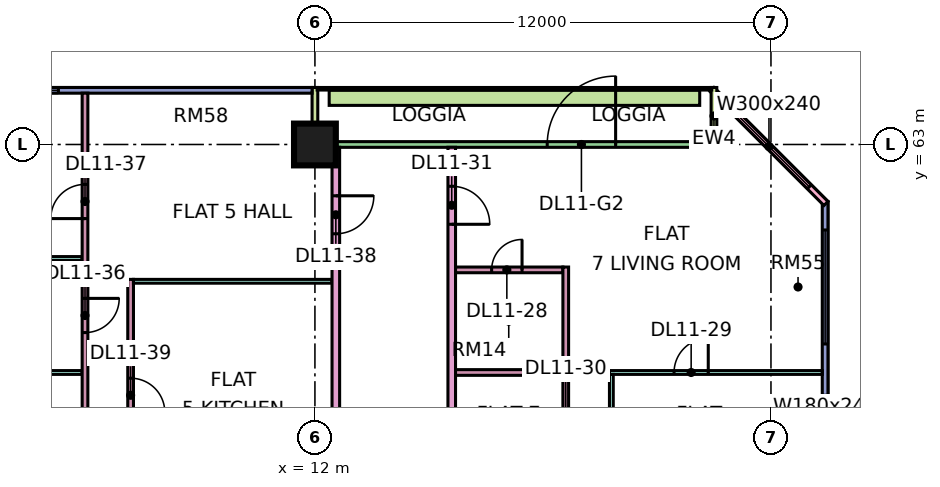
"""IFC4 building model, lengths in metres.
Left out: names, types, materials, properties, quantities, classifications, styles, units other than length and angle.
Written with IfcOpenShell. Run it as: python <this file> out.ifc"""

import sys

from ifc_helpers import new_model, si_unit, direction, frame, frame_2d, origin, origin_2d, place, context, subcontext, project, spatial, rectangle, extrude, element, fill, save


model = new_model("IFC4")
c1 = context("Model", 3, precision=1e-05, world=origin(), true_north=direction((0.0, 1.0)))
c2 = subcontext(c1, "Body", "Model", "MODEL_VIEW")
j1 = project(units=[si_unit("LENGTHUNIT", "METRE"), si_unit("PLANEANGLEUNIT", "RADIAN")], contexts=[c1])
p1 = place(None, origin())
s1 = spatial("IfcSite", under=j1, at=p1, CompositionType="ELEMENT")
p2 = place(p1, origin())
s2 = spatial("IfcBuilding", under=s1, at=p2, CompositionType="ELEMENT")
p3 = place(p2, frame((0.0, 0.0, 56.4)))
s3 = spatial("IfcBuildingStorey", under=s2, at=p3, CompositionType="ELEMENT", Elevation=56.4)
p4 = place(p3, frame((12.0, 63.0, 0.0), z_axis=(0.0, 0.0, 1.0), x_axis=(1.0, 0.0, 0.0)))
e1 = element("IfcColumn", 1, at=p4, inside=s3, PredefinedType="COLUMN", context=c2, shape_type="SweptSolid", body=[
    extrude(rectangle(XDim=1.1, YDim=1.1, at=origin_2d()), origin(), (0.0, 0.0, 1.0), 3.75),
])
p5 = place(p3, frame((25.425, 48.075, 0.0), z_axis=(0.0, 0.0, 1.0), x_axis=(0.0, 1.0, 0.0)))
e2 = element("IfcWall", 2, at=p5, inside=s3, PredefinedType="SOLIDWALL", context=c2, shape_type="SweptSolid", body=[
    extrude(rectangle(XDim=13.425, YDim=0.15, at=frame_2d((6.712, 0.0))), origin(), (0.0, 0.0, 1.0), 3.35),
])
p6 = place(p5, frame((0.562, 0.0, 0.45)))
e3 = element("IfcOpeningElement", 3, at=p6, cuts=e2, PredefinedType="OPENING", context=c2, shape_type="SweptSolid", body=[
    extrude(rectangle(XDim=4.8, YDim=2.4, at=frame_2d((2.4, 1.2))), frame((0.0, 0.085, 0.0), z_axis=(0.0, -1.0, 0.0), x_axis=(1.0, 0.0, 0.0)), (0.0, 0.0, 1.0), 0.17),
])
p7 = place(p5, frame((6.525, 0.0, 0.45)))
e4 = element("IfcOpeningElement", 4, at=p7, cuts=e2, PredefinedType="OPENING", context=c2, shape_type="SweptSolid", body=[
    extrude(rectangle(XDim=1.8, YDim=2.4, at=frame_2d((0.9, 1.2))), frame((0.0, 0.085, 0.0), z_axis=(0.0, -1.0, 0.0), x_axis=(1.0, 0.0, 0.0)), (0.0, 0.0, 1.0), 0.17),
])
p8 = place(p5, frame((9.675, 0.0, 0.45)))
e5 = element("IfcOpeningElement", 5, at=p8, cuts=e2, PredefinedType="OPENING", context=c2, shape_type="SweptSolid", body=[
    extrude(rectangle(XDim=3.0, YDim=2.4, at=frame_2d((1.5, 1.2))), frame((0.0, 0.085, 0.0), z_axis=(0.0, -1.0, 0.0), x_axis=(1.0, 0.0, 0.0)), (0.0, 0.0, 1.0), 0.17),
])
p9 = place(p3, frame((25.447, 61.447, 0.0), z_axis=(0.0, 0.0, 1.0), x_axis=(-0.707106781187, 0.707106781187, 0.0)))
e6 = element("IfcWall", 6, at=p9, inside=s3, PredefinedType="SOLIDWALL", context=c2, shape_type="SweptSolid", body=[
    extrude(rectangle(XDim=4.243, YDim=0.15, at=frame_2d((2.121, 0.0))), origin(), (0.0, 0.0, 1.0), 3.35),
])
p10 = place(p9, frame((0.621, 0.0, 0.45)))
e7 = element("IfcOpeningElement", 7, at=p10, cuts=e6, PredefinedType="OPENING", context=c2, shape_type="SweptSolid", body=[
    extrude(rectangle(XDim=3.0, YDim=2.4, at=frame_2d((1.5, 1.2))), frame((0.0, 0.085, 0.0), z_axis=(0.0, -1.0, 0.0), x_axis=(1.0, 0.0, 0.0)), (0.0, 0.0, 1.0), 0.17),
])
p11 = place(p3, frame((22.425, 63.0, 0.0), z_axis=(0.0, 0.0, 1.0), x_axis=(-1.0, 0.0, 0.0)))
e8 = element("IfcWall", 8, at=p11, inside=s3, PredefinedType="SOLIDWALL", context=c2, shape_type="SweptSolid", body=[
    extrude(rectangle(XDim=10.35, YDim=0.15, at=frame_2d((5.175, 0.0))), origin(), (0.0, 0.0, 1.0), 3.35),
])
p12 = place(p11, frame((2.512, 0.0, 0.0)))
e9 = element("IfcOpeningElement", 9, at=p12, cuts=e8, PredefinedType="OPENING", context=c2, shape_type="SweptSolid", body=[
    extrude(rectangle(XDim=1.8, YDim=2.4, at=frame_2d((0.9, 1.2))), frame((0.0, 0.085, 0.0), z_axis=(0.0, -1.0, 0.0), x_axis=(1.0, 0.0, 0.0)), (0.0, 0.0, 1.0), 0.17),
])
for number, where, z_axis, x_axis in (
    (10, (22.5, 64.5, 0.0), (0.0, 0.0, 1.0), (0.0, -1.0, 0.0)),
    (11, (12.0, 64.5, 0.0), (0.0, 0.0, 1.0), (0.0, -1.0, 0.0)),
):
    element("IfcWall", number, at=place(p3, frame(where, z_axis=z_axis, x_axis=x_axis)), inside=s3, PredefinedType="SOLIDWALL", context=c2, shape_type="SweptSolid", body=[
        extrude(rectangle(XDim=1.5, YDim=0.15, at=frame_2d((0.75, 0.0))), origin(), (0.0, 0.0, 1.0), 3.35),
    ])
p13 = place(p3, frame((11.925, 64.425, 0.0), z_axis=(0.0, 0.0, 1.0), x_axis=(-1.0, 0.0, 0.0)))
e12 = element("IfcWall", 12, at=p13, inside=s3, PredefinedType="SOLIDWALL", context=c2, shape_type="SweptSolid", body=[
    extrude(rectangle(XDim=10.425, YDim=0.15, at=frame_2d((5.212, 0.0))), origin(), (0.0, 0.0, 1.0), 3.35),
])
p14 = place(p13, frame((6.675, 0.0, 0.45)))
e13 = element("IfcOpeningElement", 13, at=p14, cuts=e12, PredefinedType="OPENING", context=c2, shape_type="SweptSolid", body=[
    extrude(rectangle(XDim=3.0, YDim=2.4, at=frame_2d((1.5, 1.2))), frame((0.0, 0.085, 0.0), z_axis=(0.0, -1.0, 0.0), x_axis=(1.0, 0.0, 0.0)), (0.0, 0.0, 1.0), 0.17),
])
p15 = place(p3, frame((22.125, 64.229, 0.0), z_axis=(0.0, 0.0, 1.0), x_axis=(-1.0, 0.0, 0.0)))
e14 = element("IfcWall", 14, at=p15, inside=s3, PredefinedType="SOLIDWALL", context=c2, shape_type="SweptSolid", body=[
    extrude(rectangle(XDim=9.75, YDim=0.4, at=frame_2d((4.875, 0.0))), origin(), (0.0, 0.0, 1.0), 0.7),
])
for number, where, z_axis, x_axis in (
    (15, (-1.351, 57.0, 0.0), (0.0, 0.0, 1.0), (1.0, 0.0, 0.0)),
    (16, (-1.351, 60.0, 0.0), (0.0, 0.0, 1.0), (1.0, 0.0, 0.0)),
):
    element("IfcWall", number, at=place(p3, frame(where, z_axis=z_axis, x_axis=x_axis)), inside=s3, PredefinedType="PARTITIONING", context=c2, shape_type="SweptSolid", body=[
        extrude(rectangle(XDim=7.226, YDim=0.1, at=frame_2d((3.613, 0.0))), origin(), (0.0, 0.0, 1.0), 3.35),
    ])
p16 = place(p3, frame((5.95, 36.1, 0.0), z_axis=(0.0, 0.0, 1.0), x_axis=(0.0, 1.0, 0.0)))
e17 = element("IfcWall", 17, at=p16, inside=s3, PredefinedType="PARTITIONING", context=c2, shape_type="SweptSolid", body=[
    extrude(rectangle(XDim=28.25, YDim=0.15, at=frame_2d((14.125, 0.0))), origin(), (0.0, 0.0, 1.0), 3.35),
])
p17 = place(p16, frame((3.95, 0.0, 0.0)))
e18 = element("IfcOpeningElement", 18, at=p17, cuts=e17, PredefinedType="OPENING", context=c2, shape_type="SweptSolid", body=[
    extrude(rectangle(XDim=0.9, YDim=2.1, at=frame_2d((0.45, 1.05))), frame((0.0, 0.085, 0.0), z_axis=(0.0, -1.0, 0.0), x_axis=(1.0, 0.0, 0.0)), (0.0, 0.0, 1.0), 0.17),
])
p18 = place(p16, frame((12.95, 0.0, 0.0)))
e19 = element("IfcOpeningElement", 19, at=p18, cuts=e17, PredefinedType="OPENING", context=c2, shape_type="SweptSolid", body=[
    extrude(rectangle(XDim=0.9, YDim=2.1, at=frame_2d((0.45, 1.05))), frame((0.0, 0.085, 0.0), z_axis=(0.0, -1.0, 0.0), x_axis=(1.0, 0.0, 0.0)), (0.0, 0.0, 1.0), 0.17),
])
p19 = place(p16, frame((18.95, 0.0, 0.0)))
e20 = element("IfcOpeningElement", 20, at=p19, cuts=e17, PredefinedType="OPENING", context=c2, shape_type="SweptSolid", body=[
    extrude(rectangle(XDim=0.9, YDim=2.1, at=frame_2d((0.45, 1.05))), frame((0.0, 0.085, 0.0), z_axis=(0.0, -1.0, 0.0), x_axis=(1.0, 0.0, 0.0)), (0.0, 0.0, 1.0), 0.17),
])
p20 = place(p16, frame((21.95, 0.0, 0.0)))
e21 = element("IfcOpeningElement", 21, at=p20, cuts=e17, PredefinedType="OPENING", context=c2, shape_type="SweptSolid", body=[
    extrude(rectangle(XDim=0.9, YDim=2.1, at=frame_2d((0.45, 1.05))), frame((0.0, 0.085, 0.0), z_axis=(0.0, -1.0, 0.0), x_axis=(1.0, 0.0, 0.0)), (0.0, 0.0, 1.0), 0.17),
])
p21 = place(p16, frame((24.95, 0.0, 0.0)))
e22 = element("IfcOpeningElement", 22, at=p21, cuts=e17, PredefinedType="OPENING", context=c2, shape_type="SweptSolid", body=[
    extrude(rectangle(XDim=0.9, YDim=2.1, at=frame_2d((0.45, 1.05))), frame((0.0, 0.085, 0.0), z_axis=(0.0, -1.0, 0.0), x_axis=(1.0, 0.0, 0.0)), (0.0, 0.0, 1.0), 0.17),
])
p22 = place(p16, frame((15.95, 0.0, 0.0)))
e23 = element("IfcOpeningElement", 23, at=p22, cuts=e17, PredefinedType="OPENING", context=c2, shape_type="SweptSolid", body=[
    extrude(rectangle(XDim=0.9, YDim=2.1, at=frame_2d((0.45, 1.05))), frame((0.0, 0.085, 0.0), z_axis=(0.0, -1.0, 0.0), x_axis=(1.0, 0.0, 0.0)), (0.0, 0.0, 1.0), 0.17),
])
p23 = place(p16, frame((10.8, 0.0, 0.0)))
e24 = element("IfcOpeningElement", 24, at=p23, cuts=e17, PredefinedType="OPENING", context=c2, shape_type="SweptSolid", body=[
    extrude(rectangle(XDim=0.8, YDim=2.1, at=frame_2d((0.4, 1.05))), frame((0.0, 0.085, 0.0), z_axis=(0.0, -1.0, 0.0), x_axis=(1.0, 0.0, 0.0)), (0.0, 0.0, 1.0), 0.17),
])
p24 = place(p16, frame((0.55, 0.0, 0.0)))
e25 = element("IfcOpeningElement", 25, at=p24, cuts=e17, PredefinedType="OPENING", context=c2, shape_type="SweptSolid", body=[
    extrude(rectangle(XDim=1.6, YDim=2.1, at=frame_2d((0.8, 1.05))), frame((0.0, 0.085, 0.0), z_axis=(0.0, -1.0, 0.0), x_axis=(1.0, 0.0, 0.0)), (0.0, 0.0, 1.0), 0.17),
])
p25 = place(p16, frame((6.95, 0.0, 0.0)))
e26 = element("IfcOpeningElement", 26, at=p25, cuts=e17, PredefinedType="OPENING", context=c2, shape_type="SweptSolid", body=[
    extrude(rectangle(XDim=0.9, YDim=2.1, at=frame_2d((0.45, 1.05))), frame((0.0, 0.085, 0.0), z_axis=(0.0, -1.0, 0.0), x_axis=(1.0, 0.0, 0.0)), (0.0, 0.0, 1.0), 0.17),
])
p26 = place(p3, frame((7.15, 36.1, 0.0), z_axis=(0.0, 0.0, 1.0), x_axis=(0.0, 1.0, 0.0)))
e27 = element("IfcWall", 27, at=p26, inside=s3, PredefinedType="PARTITIONING", context=c2, shape_type="SweptSolid", body=[
    extrude(rectangle(XDim=23.35, YDim=0.15, at=frame_2d((11.675, 0.0))), origin(), (0.0, 0.0, 1.0), 3.35),
])
p27 = place(p26, frame((10.25, 0.0, 0.0)))
e28 = element("IfcOpeningElement", 28, at=p27, cuts=e27, PredefinedType="OPENING", context=c2, shape_type="SweptSolid", body=[
    extrude(rectangle(XDim=0.8, YDim=2.1, at=frame_2d((0.4, 1.05))), frame((0.0, 0.085, 0.0), z_axis=(0.0, -1.0, 0.0), x_axis=(1.0, 0.0, 0.0)), (0.0, 0.0, 1.0), 0.17),
])
p28 = place(p26, frame((19.85, 0.0, 0.0)))
e29 = element("IfcOpeningElement", 29, at=p28, cuts=e27, PredefinedType="OPENING", context=c2, shape_type="SweptSolid", body=[
    extrude(rectangle(XDim=0.9, YDim=2.1, at=frame_2d((0.45, 1.05))), frame((0.0, 0.085, 0.0), z_axis=(0.0, -1.0, 0.0), x_axis=(1.0, 0.0, 0.0)), (0.0, 0.0, 1.0), 0.17),
])
p29 = place(p26, frame((3.65, 0.0, 0.0)))
e30 = element("IfcOpeningElement", 30, at=p29, cuts=e27, PredefinedType="OPENING", context=c2, shape_type="SweptSolid", body=[
    extrude(rectangle(XDim=0.8, YDim=2.1, at=frame_2d((0.4, 1.05))), frame((0.0, 0.085, 0.0), z_axis=(0.0, -1.0, 0.0), x_axis=(1.0, 0.0, 0.0)), (0.0, 0.0, 1.0), 0.17),
])
p30 = place(p26, frame((13.25, 0.0, 0.0)))
e31 = element("IfcOpeningElement", 31, at=p30, cuts=e27, PredefinedType="OPENING", context=c2, shape_type="SweptSolid", body=[
    extrude(rectangle(XDim=0.8, YDim=2.1, at=frame_2d((0.4, 1.05))), frame((0.0, 0.085, 0.0), z_axis=(0.0, -1.0, 0.0), x_axis=(1.0, 0.0, 0.0)), (0.0, 0.0, 1.0), 0.17),
])
p31 = place(p26, frame((15.65, 0.0, 0.0)))
e32 = element("IfcOpeningElement", 32, at=p31, cuts=e27, PredefinedType="OPENING", context=c2, shape_type="SweptSolid", body=[
    extrude(rectangle(XDim=0.8, YDim=2.1, at=frame_2d((0.4, 1.05))), frame((0.0, 0.085, 0.0), z_axis=(0.0, -1.0, 0.0), x_axis=(1.0, 0.0, 0.0)), (0.0, 0.0, 1.0), 0.17),
])
p32 = place(p26, frame((0.65, 0.0, 0.0)))
e33 = element("IfcOpeningElement", 33, at=p32, cuts=e27, PredefinedType="OPENING", context=c2, shape_type="SweptSolid", body=[
    extrude(rectangle(XDim=0.9, YDim=2.1, at=frame_2d((0.45, 1.05))), frame((0.0, 0.085, 0.0), z_axis=(0.0, -1.0, 0.0), x_axis=(1.0, 0.0, 0.0)), (0.0, 0.0, 1.0), 0.17),
])
p33 = place(p26, frame((6.95, 0.0, 0.0)))
e34 = element("IfcOpeningElement", 34, at=p33, cuts=e27, PredefinedType="OPENING", context=c2, shape_type="SweptSolid", body=[
    extrude(rectangle(XDim=0.8, YDim=2.1, at=frame_2d((0.4, 1.05))), frame((0.0, 0.085, 0.0), z_axis=(0.0, -1.0, 0.0), x_axis=(1.0, 0.0, 0.0)), (0.0, 0.0, 1.0), 0.17),
])
p34 = place(p3, frame((7.225, 59.4, 0.0), z_axis=(0.0, 0.0, 1.0), x_axis=(1.0, 0.0, 0.0)))
e35 = element("IfcWall", 35, at=p34, inside=s3, PredefinedType="PARTITIONING", context=c2, shape_type="SweptSolid", body=[
    extrude(rectangle(XDim=5.225, YDim=0.1, at=frame_2d((2.612, 0.0))), origin(), (0.0, 0.0, 1.0), 3.35),
])
p35 = place(p3, frame((12.55, 20.0, 0.0), z_axis=(0.0, 0.0, 1.0), x_axis=(0.0, 1.0, 0.0)))
e36 = element("IfcWall", 36, at=p35, inside=s3, PredefinedType="PARTITIONING", context=c2, shape_type="SweptSolid", body=[
    extrude(rectangle(XDim=42.926, YDim=0.2, at=frame_2d((21.463, 0.0))), origin(), (0.0, 0.0, 1.0), 3.35),
])
p36 = place(p35, frame((40.65, 0.0, 0.0)))
e37 = element("IfcOpeningElement", 37, at=p36, cuts=e36, PredefinedType="OPENING", context=c2, shape_type="SweptSolid", body=[
    extrude(rectangle(XDim=1.0, YDim=2.1, at=frame_2d((0.5, 1.05))), frame((0.0, 0.11, 0.0), z_axis=(0.0, -1.0, 0.0), x_axis=(1.0, 0.0, 0.0)), (0.0, 0.0, 1.0), 0.22),
])
p37 = place(p35, frame((0.6, 0.0, 0.0)))
e38 = element("IfcOpeningElement", 38, at=p37, cuts=e36, PredefinedType="OPENING", context=c2, shape_type="SweptSolid", body=[
    extrude(rectangle(XDim=1.2, YDim=2.1, at=frame_2d((0.6, 1.05))), frame((0.0, 0.11, 0.0), z_axis=(0.0, -1.0, 0.0), x_axis=(1.0, 0.0, 0.0)), (0.0, 0.0, 1.0), 0.22),
])
p38 = place(p35, frame((14.1, 0.0, 0.0)))
e39 = element("IfcOpeningElement", 39, at=p38, cuts=e36, PredefinedType="OPENING", context=c2, shape_type="SweptSolid", body=[
    extrude(rectangle(XDim=1.0, YDim=2.1, at=frame_2d((0.5, 1.05))), frame((0.0, 0.11, 0.0), z_axis=(0.0, -1.0, 0.0), x_axis=(1.0, 0.0, 0.0)), (0.0, 0.0, 1.0), 0.22),
])
p39 = place(p3, frame((15.6, 51.225, 0.0), z_axis=(0.0, 0.0, 1.0), x_axis=(0.0, 1.0, 0.0)))
e40 = element("IfcWall", 40, at=p39, inside=s3, PredefinedType="PARTITIONING", context=c2, shape_type="SweptSolid", body=[
    extrude(rectangle(XDim=11.701, YDim=0.2, at=frame_2d((5.851, 0.0))), origin(), (0.0, 0.0, 1.0), 3.35),
])
p40 = place(p39, frame((9.675, 0.0, 0.0)))
e41 = element("IfcOpeningElement", 41, at=p40, cuts=e40, PredefinedType="OPENING", context=c2, shape_type="SweptSolid", body=[
    extrude(rectangle(XDim=1.0, YDim=2.1, at=frame_2d((0.5, 1.05))), frame((0.0, 0.11, 0.0), z_axis=(0.0, -1.0, 0.0), x_axis=(1.0, 0.0, 0.0)), (0.0, 0.0, 1.0), 0.22),
])
p41 = place(p3, frame((15.7, 57.0, 0.0), z_axis=(0.0, 0.0, 1.0), x_axis=(1.0, 0.0, 0.0)))
e42 = element("IfcWall", 42, at=p41, inside=s3, PredefinedType="PARTITIONING", context=c2, shape_type="SweptSolid", body=[
    extrude(rectangle(XDim=2.825, YDim=0.15, at=frame_2d((1.413, 0.0))), origin(), (0.0, 0.0, 1.0), 3.35),
])
p42 = place(p3, frame((15.7, 59.7, 0.0), z_axis=(0.0, 0.0, 1.0), x_axis=(1.0, 0.0, 0.0)))
e43 = element("IfcWall", 43, at=p42, inside=s3, PredefinedType="PARTITIONING", context=c2, shape_type="SweptSolid", body=[
    extrude(rectangle(XDim=2.825, YDim=0.15, at=frame_2d((1.413, 0.0))), origin(), (0.0, 0.0, 1.0), 3.35),
])
p43 = place(p42, frame((0.95, 0.0, 0.0)))
e44 = element("IfcOpeningElement", 44, at=p43, cuts=e43, PredefinedType="OPENING", context=c2, shape_type="SweptSolid", body=[
    extrude(rectangle(XDim=0.8, YDim=2.1, at=frame_2d((0.4, 1.05))), frame((0.0, 0.085, 0.0), z_axis=(0.0, -1.0, 0.0), x_axis=(1.0, 0.0, 0.0)), (0.0, 0.0, 1.0), 0.17),
])
p44 = place(p3, frame((18.6, 54.1, 0.0), z_axis=(0.0, 0.0, 1.0), x_axis=(0.0, 1.0, 0.0)))
e45 = element("IfcWall", 45, at=p44, inside=s3, PredefinedType="PARTITIONING", context=c2, shape_type="SweptSolid", body=[
    extrude(rectangle(XDim=5.675, YDim=0.15, at=frame_2d((2.837, 0.0))), origin(), (0.0, 0.0, 1.0), 3.35),
])
p45 = place(p44, frame((0.95, 0.0, 0.0)))
e46 = element("IfcOpeningElement", 46, at=p45, cuts=e45, PredefinedType="OPENING", context=c2, shape_type="SweptSolid", body=[
    extrude(rectangle(XDim=0.9, YDim=2.1, at=frame_2d((0.45, 1.05))), frame((0.0, 0.085, 0.0), z_axis=(0.0, -1.0, 0.0), x_axis=(1.0, 0.0, 0.0)), (0.0, 0.0, 1.0), 0.17),
])
p46 = place(p3, frame((19.75, 57.0, 0.0), z_axis=(0.0, 0.0, 1.0), x_axis=(1.0, 0.0, 0.0)))
e47 = element("IfcWall", 47, at=p46, inside=s3, PredefinedType="PARTITIONING", context=c2, shape_type="SweptSolid", body=[
    extrude(rectangle(XDim=5.6, YDim=0.1, at=frame_2d((2.8, 0.0))), origin(), (0.0, 0.0, 1.0), 3.35),
])
p47 = place(p46, frame((1.7, 0.0, 0.0)))
e48 = element("IfcOpeningElement", 48, at=p47, cuts=e47, PredefinedType="OPENING", context=c2, shape_type="SweptSolid", body=[
    extrude(rectangle(XDim=0.9, YDim=2.1, at=frame_2d((0.45, 1.05))), frame((0.0, 0.06, 0.0), z_axis=(0.0, -1.0, 0.0), x_axis=(1.0, 0.0, 0.0)), (0.0, 0.0, 1.0), 0.12),
])
p48 = place(p3, frame((19.8, 54.1, 0.0), z_axis=(0.0, 0.0, 1.0), x_axis=(0.0, 1.0, 0.0)))
e49 = element("IfcWall", 49, at=p48, inside=s3, PredefinedType="PARTITIONING", context=c2, shape_type="SweptSolid", body=[
    extrude(rectangle(XDim=2.85, YDim=0.1, at=frame_2d((1.425, 0.0))), origin(), (0.0, 0.0, 1.0), 3.35),
])
p49 = place(p7, origin())
e50 = element("IfcWindow", 50, at=p49, inside=s3, PartitioningType="SINGLE_PANEL", PredefinedType="WINDOW", context=c2, shape_type="SweptSolid", body=[
    extrude(rectangle(XDim=1.8, YDim=2.4, at=frame_2d((0.9, 1.2))), frame((0.0, 0.03, 0.0), z_axis=(0.0, -1.0, 0.0), x_axis=(1.0, 0.0, 0.0)), (0.0, 0.0, 1.0), 0.06),
])
fill(e4, e50)
p50 = place(p8, origin())
e51 = element("IfcWindow", 51, at=p50, inside=s3, PartitioningType="SINGLE_PANEL", PredefinedType="WINDOW", context=c2, shape_type="SweptSolid", body=[
    extrude(rectangle(XDim=3.0, YDim=2.4, at=frame_2d((1.5, 1.2))), frame((0.0, 0.03, 0.0), z_axis=(0.0, -1.0, 0.0), x_axis=(1.0, 0.0, 0.0)), (0.0, 0.0, 1.0), 0.06),
])
fill(e5, e51)
p51 = place(p10, origin())
e52 = element("IfcWindow", 52, at=p51, inside=s3, PartitioningType="SINGLE_PANEL", PredefinedType="WINDOW", context=c2, shape_type="SweptSolid", body=[
    extrude(rectangle(XDim=3.0, YDim=2.4, at=frame_2d((1.5, 1.2))), frame((0.0, 0.03, 0.0), z_axis=(0.0, -1.0, 0.0), x_axis=(1.0, 0.0, 0.0)), (0.0, 0.0, 1.0), 0.06),
])
fill(e7, e52)
p52 = place(p12, frame((1.8, 0.0, 0.0), z_axis=(0.0, 0.0, 1.0), x_axis=(-1.0, 0.0, 0.0)))
e53 = element("IfcDoor", 53, at=p52, inside=s3, OperationType="DOUBLE_DOOR_SINGLE_SWING", PredefinedType="DOOR", context=c2, shape_type="SweptSolid", body=[
    extrude(rectangle(XDim=1.8, YDim=2.4, at=frame_2d((0.9, 1.2))), frame((0.0, 0.025, 0.0), z_axis=(0.0, -1.0, 0.0), x_axis=(1.0, 0.0, 0.0)), (0.0, 0.0, 1.0), 0.05),
])
fill(e9, e53)
p53 = place(p14, origin())
e54 = element("IfcWindow", 54, at=p53, inside=s3, PartitioningType="SINGLE_PANEL", PredefinedType="WINDOW", context=c2, shape_type="SweptSolid", body=[
    extrude(rectangle(XDim=3.0, YDim=2.4, at=frame_2d((1.5, 1.2))), frame((0.0, 0.03, 0.0), z_axis=(0.0, -1.0, 0.0), x_axis=(1.0, 0.0, 0.0)), (0.0, 0.0, 1.0), 0.06),
])
fill(e13, e54)
p54 = place(p43, frame((0.8, 0.0, 0.0), z_axis=(0.0, 0.0, 1.0), x_axis=(-1.0, 0.0, 0.0)))
e55 = element("IfcDoor", 55, at=p54, inside=s3, OperationType="SINGLE_SWING_RIGHT", PredefinedType="DOOR", context=c2, shape_type="SweptSolid", body=[
    extrude(rectangle(XDim=0.8, YDim=2.1, at=frame_2d((0.4, 1.05))), frame((0.0, 0.025, 0.0), z_axis=(0.0, -1.0, 0.0), x_axis=(1.0, 0.0, 0.0)), (0.0, 0.0, 1.0), 0.05),
])
fill(e44, e55)
p55 = place(p47, frame((0.9, 0.0, 0.0), z_axis=(0.0, 0.0, 1.0), x_axis=(-1.0, 0.0, 0.0)))
e56 = element("IfcDoor", 56, at=p55, inside=s3, OperationType="SINGLE_SWING_RIGHT", PredefinedType="DOOR", context=c2, shape_type="SweptSolid", body=[
    extrude(rectangle(XDim=0.9, YDim=2.1, at=frame_2d((0.45, 1.05))), frame((0.0, 0.025, 0.0), z_axis=(0.0, -1.0, 0.0), x_axis=(1.0, 0.0, 0.0)), (0.0, 0.0, 1.0), 0.05),
])
fill(e48, e56)
p56 = place(p40, frame((1.0, 0.0, 0.0), z_axis=(0.0, 0.0, 1.0), x_axis=(-1.0, 0.0, 0.0)))
e57 = element("IfcDoor", 57, at=p56, inside=s3, OperationType="SINGLE_SWING_LEFT", PredefinedType="DOOR", context=c2, shape_type="SweptSolid", body=[
    extrude(rectangle(XDim=1.0, YDim=2.1, at=frame_2d((0.5, 1.05))), frame((0.0, 0.025, 0.0), z_axis=(0.0, -1.0, 0.0), x_axis=(1.0, 0.0, 0.0)), (0.0, 0.0, 1.0), 0.05),
])
fill(e41, e57)
p57 = place(p20, origin())
e58 = element("IfcDoor", 58, at=p57, inside=s3, OperationType="SINGLE_SWING_RIGHT", PredefinedType="DOOR", context=c2, shape_type="SweptSolid", body=[
    extrude(rectangle(XDim=0.9, YDim=2.1, at=frame_2d((0.45, 1.05))), frame((0.0, 0.025, 0.0), z_axis=(0.0, -1.0, 0.0), x_axis=(1.0, 0.0, 0.0)), (0.0, 0.0, 1.0), 0.05),
])
fill(e21, e58)
p58 = place(p21, origin())
e59 = element("IfcDoor", 59, at=p58, inside=s3, OperationType="SINGLE_SWING_LEFT", PredefinedType="DOOR", context=c2, shape_type="SweptSolid", body=[
    extrude(rectangle(XDim=0.9, YDim=2.1, at=frame_2d((0.45, 1.05))), frame((0.0, 0.025, 0.0), z_axis=(0.0, -1.0, 0.0), x_axis=(1.0, 0.0, 0.0)), (0.0, 0.0, 1.0), 0.05),
])
fill(e22, e59)
p59 = place(p36, origin())
e60 = element("IfcDoor", 60, at=p59, inside=s3, OperationType="SINGLE_SWING_RIGHT", PredefinedType="DOOR", context=c2, shape_type="SweptSolid", body=[
    extrude(rectangle(XDim=1.0, YDim=2.1, at=frame_2d((0.5, 1.05))), frame((0.0, 0.025, 0.0), z_axis=(0.0, -1.0, 0.0), x_axis=(1.0, 0.0, 0.0)), (0.0, 0.0, 1.0), 0.05),
])
fill(e37, e60)
p60 = place(p28, frame((0.9, 0.0, 0.0), z_axis=(0.0, 0.0, 1.0), x_axis=(-1.0, 0.0, 0.0)))
e61 = element("IfcDoor", 61, at=p60, inside=s3, OperationType="SINGLE_SWING_LEFT", PredefinedType="DOOR", context=c2, shape_type="SweptSolid", body=[
    extrude(rectangle(XDim=0.9, YDim=2.1, at=frame_2d((0.45, 1.05))), frame((0.0, 0.025, 0.0), z_axis=(0.0, -1.0, 0.0), x_axis=(1.0, 0.0, 0.0)), (0.0, 0.0, 1.0), 0.05),
])
fill(e29, e61)
save(model, sys.argv[1])
